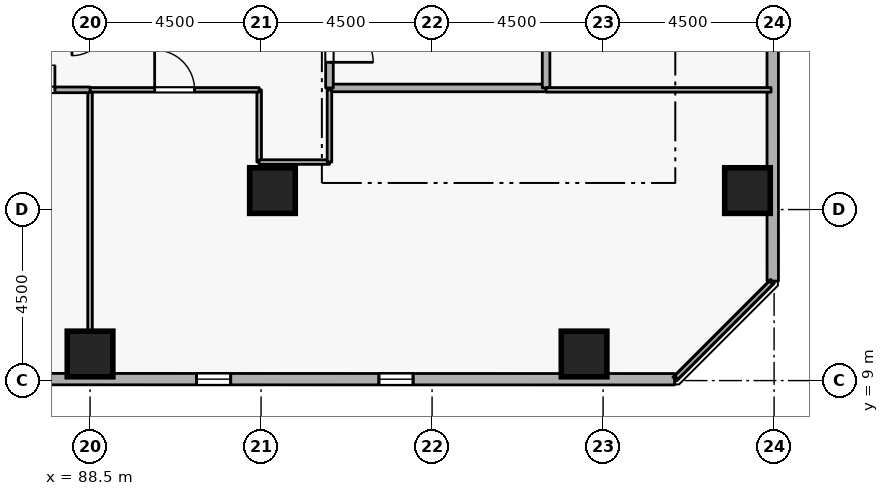
"""IFC4 building model, lengths in metres.
Left out: names, types, materials, properties, quantities, classifications, styles, units other than length and angle.
Written with IfcOpenShell. Run it as: python <this file> out.ifc"""

import sys

from ifc_helpers import new_model, si_unit, direction, frame, frame_2d, origin, origin_2d, place, context, subcontext, project, spatial, rectangle, extrude, element, fill, save


model = new_model("IFC4")
c1 = context("Model", 3, precision=1e-05, world=origin(), true_north=direction((0.0, 1.0)))
c2 = subcontext(c1, "Body", "Model", "MODEL_VIEW")
j1 = project(units=[si_unit("LENGTHUNIT", "METRE"), si_unit("PLANEANGLEUNIT", "RADIAN")], contexts=[c1])
p1 = place(None, origin())
s1 = spatial("IfcSite", under=j1, at=p1, CompositionType="ELEMENT")
p2 = place(p1, origin())
s2 = spatial("IfcBuilding", under=s1, at=p2, CompositionType="ELEMENT")
p3 = place(p2, frame((0.0, 0.0, 90.9)))
s3 = spatial("IfcBuildingStorey", under=s2, at=p3, CompositionType="ELEMENT", Elevation=90.9)
for number, where, z_axis, x_axis in (
    (1, (105.8, 14.0, 0.0), (0.0, 0.0, 1.0), (1.0, 0.0, 0.0)),
    (2, (101.5, 9.7, 0.0), (0.0, 0.0, 1.0), (1.0, 0.0, 0.0)),
    (3, (88.5, 9.7, 0.0), (0.0, 0.0, 1.0), (1.0, 0.0, 0.0)),
    (4, (93.3, 14.0, 0.0), (0.0, 0.0, 1.0), (1.0, 0.0, 0.0)),
):
    element("IfcColumn", number, at=place(p3, frame(where, z_axis=z_axis, x_axis=x_axis)), inside=s3, PredefinedType="COLUMN", context=c2, shape_type="SweptSolid", body=[
        extrude(rectangle(XDim=1.2, YDim=1.2, at=origin_2d()), origin(), (0.0, 0.0, 1.0), 3.6),
    ])
p4 = place(p3, frame((69.401, 9.043, 0.0), z_axis=(0.0, 0.0, 1.0), x_axis=(0.99999997744, -0.000212414941, 0.0)))
e5 = element("IfcWall", 5, at=p4, inside=s3, PredefinedType="STANDARD", context=c2, shape_type="SweptSolid", body=[
    extrude(rectangle(XDim=34.481, YDim=0.3, at=frame_2d((17.24, 0.0))), origin(), (0.0, 0.0, 1.0), 2.7),
])
p5 = place(p4, frame((7.5, 0.0, 0.72)))
e6 = element("IfcOpeningElement", 6, at=p5, cuts=e5, PredefinedType="OPENING", context=c2, shape_type="SweptSolid", body=[
    extrude(rectangle(XDim=0.9, YDim=1.75, at=frame_2d((0.45, 0.875))), frame((0.0, 0.16, 0.0), z_axis=(0.0, -1.0, 0.0), x_axis=(1.0, 0.0, 0.0)), (0.0, 0.0, 1.0), 0.32),
])
p6 = place(p4, frame((12.3, 0.0, 0.72)))
e7 = element("IfcOpeningElement", 7, at=p6, cuts=e5, PredefinedType="OPENING", context=c2, shape_type="SweptSolid", body=[
    extrude(rectangle(XDim=0.9, YDim=1.75, at=frame_2d((0.45, 0.875))), frame((0.0, 0.16, 0.0), z_axis=(0.0, -1.0, 0.0), x_axis=(1.0, 0.0, 0.0)), (0.0, 0.0, 1.0), 0.32),
])
p7 = place(p4, frame((17.1, 0.0, 0.72)))
e8 = element("IfcOpeningElement", 8, at=p7, cuts=e5, PredefinedType="OPENING", context=c2, shape_type="SweptSolid", body=[
    extrude(rectangle(XDim=0.9, YDim=1.75, at=frame_2d((0.45, 0.875))), frame((0.0, 0.16, 0.0), z_axis=(0.0, -1.0, 0.0), x_axis=(1.0, 0.0, 0.0)), (0.0, 0.0, 1.0), 0.32),
])
p8 = place(p4, frame((21.9, 0.0, 0.72)))
e9 = element("IfcOpeningElement", 9, at=p8, cuts=e5, PredefinedType="OPENING", context=c2, shape_type="SweptSolid", body=[
    extrude(rectangle(XDim=0.9, YDim=1.75, at=frame_2d((0.45, 0.875))), frame((0.0, 0.16, 0.0), z_axis=(0.0, -1.0, 0.0), x_axis=(1.0, 0.0, 0.0)), (0.0, 0.0, 1.0), 0.32),
])
p9 = place(p4, frame((26.7, 0.0, 0.72)))
e10 = element("IfcOpeningElement", 10, at=p9, cuts=e5, PredefinedType="OPENING", context=c2, shape_type="SweptSolid", body=[
    extrude(rectangle(XDim=0.9, YDim=1.75, at=frame_2d((0.45, 0.875))), frame((0.0, 0.16, 0.0), z_axis=(0.0, -1.0, 0.0), x_axis=(1.0, 0.0, 0.0)), (0.0, 0.0, 1.0), 0.32),
])
p10 = place(p3, frame((106.465, 11.619, 0.0), z_axis=(0.0, 0.0, 1.0), x_axis=(-0.000212414941, 0.99999997744, 0.0)))
e11 = element("IfcWall", 11, at=p10, inside=s3, PredefinedType="STANDARD", context=c2, shape_type="SweptSolid", body=[
    extrude(rectangle(XDim=34.481, YDim=0.3, at=frame_2d((17.24, 0.0))), origin(), (0.0, 0.0, 1.0), 2.7),
])
p11 = place(p10, frame((7.5, 0.0, 0.72)))
e12 = element("IfcOpeningElement", 12, at=p11, cuts=e11, PredefinedType="OPENING", context=c2, shape_type="SweptSolid", body=[
    extrude(rectangle(XDim=0.9, YDim=1.75, at=frame_2d((0.45, 0.875))), frame((0.0, 0.16, 0.0), z_axis=(0.0, -1.0, 0.0), x_axis=(1.0, 0.0, 0.0)), (0.0, 0.0, 1.0), 0.32),
])
p12 = place(p10, frame((12.3, 0.0, 0.72)))
e13 = element("IfcOpeningElement", 13, at=p12, cuts=e11, PredefinedType="OPENING", context=c2, shape_type="SweptSolid", body=[
    extrude(rectangle(XDim=0.9, YDim=1.75, at=frame_2d((0.45, 0.875))), frame((0.0, 0.16, 0.0), z_axis=(0.0, -1.0, 0.0), x_axis=(1.0, 0.0, 0.0)), (0.0, 0.0, 1.0), 0.32),
])
p13 = place(p10, frame((17.1, 0.0, 0.72)))
e14 = element("IfcOpeningElement", 14, at=p13, cuts=e11, PredefinedType="OPENING", context=c2, shape_type="SweptSolid", body=[
    extrude(rectangle(XDim=0.9, YDim=1.75, at=frame_2d((0.45, 0.875))), frame((0.0, 0.16, 0.0), z_axis=(0.0, -1.0, 0.0), x_axis=(1.0, 0.0, 0.0)), (0.0, 0.0, 1.0), 0.32),
])
p14 = place(p10, frame((21.9, 0.0, 0.72)))
e15 = element("IfcOpeningElement", 15, at=p14, cuts=e11, PredefinedType="OPENING", context=c2, shape_type="SweptSolid", body=[
    extrude(rectangle(XDim=0.9, YDim=1.75, at=frame_2d((0.45, 0.875))), frame((0.0, 0.16, 0.0), z_axis=(0.0, -1.0, 0.0), x_axis=(1.0, 0.0, 0.0)), (0.0, 0.0, 1.0), 0.32),
])
p15 = place(p10, frame((31.5, 0.0, 0.72)))
e16 = element("IfcOpeningElement", 16, at=p15, cuts=e11, PredefinedType="OPENING", context=c2, shape_type="SweptSolid", body=[
    extrude(rectangle(XDim=0.9, YDim=1.75, at=frame_2d((0.45, 0.875))), frame((0.0, 0.16, 0.0), z_axis=(0.0, -1.0, 0.0), x_axis=(1.0, 0.0, 0.0)), (0.0, 0.0, 1.0), 0.32),
])
p16 = place(p3, frame((94.8, 16.7, 0.0), z_axis=(0.0, 0.0, 1.0), x_axis=(1.0, 0.0, 0.0)))
e17 = element("IfcWall", 17, at=p16, inside=s3, PredefinedType="STANDARD", context=c2, shape_type="SweptSolid", body=[
    extrude(rectangle(XDim=5.7, YDim=0.2, at=frame_2d((2.85, 0.0))), origin(), (0.0, 0.0, 1.0), 3.34),
])
p17 = place(p3, frame((100.5, 16.7, 0.0), z_axis=(0.0, 0.0, 1.0), x_axis=(0.0, 1.0, 0.0)))
e18 = element("IfcWall", 18, at=p17, inside=s3, PredefinedType="STANDARD", context=c2, shape_type="SweptSolid", body=[
    extrude(rectangle(XDim=2.5, YDim=0.2, at=frame_2d((1.25, 0.0))), origin(), (0.0, 0.0, 1.0), 3.34),
])
p18 = place(p3, frame((94.8, 19.2, 0.0), z_axis=(0.0, 0.0, 1.0), x_axis=(0.0, -1.0, 0.0)))
e19 = element("IfcWall", 19, at=p18, inside=s3, PredefinedType="STANDARD", context=c2, shape_type="SweptSolid", body=[
    extrude(rectangle(XDim=2.5, YDim=0.2, at=frame_2d((1.25, 0.0))), origin(), (0.0, 0.0, 1.0), 3.34),
])
p19 = place(p18, frame((0.675, 0.0, 0.0)))
e20 = element("IfcOpeningElement", 20, at=p19, cuts=e19, PredefinedType="OPENING", context=c2, shape_type="SweptSolid", body=[
    extrude(rectangle(XDim=1.15, YDim=2.1, at=frame_2d((0.575, 1.05))), frame((0.0, 0.11, 0.0), z_axis=(0.0, -1.0, 0.0), x_axis=(1.0, 0.0, 0.0)), (0.0, 0.0, 1.0), 0.22),
])
p20 = place(p3, frame((92.95, 16.65, 0.0), z_axis=(0.0, 0.0, 1.0), x_axis=(0.0, -1.0, 0.0)))
e21 = element("IfcWall", 21, at=p20, inside=s3, PredefinedType="PARTITIONING", context=c2, shape_type="SweptSolid", body=[
    extrude(rectangle(XDim=1.9, YDim=0.12, at=frame_2d((0.95, 0.0))), origin(), (0.0, 0.0, 1.0), 3.34),
])
p21 = place(p3, frame((92.95, 14.75, 0.0), z_axis=(0.0, 0.0, 1.0), x_axis=(1.0, 0.0, 0.0)))
e22 = element("IfcWall", 22, at=p21, inside=s3, PredefinedType="PARTITIONING", context=c2, shape_type="SweptSolid", body=[
    extrude(rectangle(XDim=1.85, YDim=0.12, at=frame_2d((0.925, 0.0))), origin(), (0.0, 0.0, 1.0), 3.34),
])
p22 = place(p3, frame((94.8, 14.75, 0.0), z_axis=(0.0, 0.0, 1.0), x_axis=(0.0, 1.0, 0.0)))
e23 = element("IfcWall", 23, at=p22, inside=s3, PredefinedType="PARTITIONING", context=c2, shape_type="SweptSolid", body=[
    extrude(rectangle(XDim=1.9, YDim=0.12, at=frame_2d((0.95, 0.0))), origin(), (0.0, 0.0, 1.0), 3.34),
])
p23 = place(p3, frame((100.5, 16.65, 0.0), z_axis=(0.0, 0.0, 1.0), x_axis=(1.0, 0.0, 0.0)))
e24 = element("IfcWall", 24, at=p23, inside=s3, PredefinedType="PARTITIONING", context=c2, shape_type="SweptSolid", body=[
    extrude(rectangle(XDim=5.92, YDim=0.12, at=frame_2d((2.96, 0.0))), origin(), (0.0, 0.0, 1.0), 3.34),
])
p24 = place(p3, frame((106.42, 11.575, 0.0), z_axis=(0.0, 0.0, 1.0), x_axis=(-0.707106781187, -0.707106781187, 0.0)))
e25 = element("IfcWall", 25, at=p24, inside=s3, PredefinedType="PARTITIONING", context=c2, shape_type="SweptSolid", body=[
    extrude(rectangle(XDim=3.528, YDim=0.12, at=frame_2d((1.764, 0.0))), origin(), (0.0, 0.0, 1.0), 3.34),
])
p25 = place(p3, frame((88.5, 9.7, 0.0), z_axis=(0.0, 0.0, 1.0), x_axis=(0.0, 1.0, 0.0)))
e26 = element("IfcWall", 26, at=p25, inside=s3, PredefinedType="PARTITIONING", context=c2, shape_type="SweptSolid", body=[
    extrude(rectangle(XDim=6.95, YDim=0.12, at=frame_2d((3.475, 0.0))), origin(), (0.0, 0.0, 1.0), 2.932),
])
p26 = place(p3, frame((88.5, 16.65, 0.0), z_axis=(0.0, 0.0, 1.0), x_axis=(1.0, 0.0, 0.0)))
e27 = element("IfcWall", 27, at=p26, inside=s3, PredefinedType="PARTITIONING", context=c2, shape_type="SweptSolid", body=[
    extrude(rectangle(XDim=4.45, YDim=0.12, at=frame_2d((2.225, 0.0))), origin(), (0.0, 0.0, 1.0), 3.34),
])
p27 = place(p26, frame((1.7, 0.0, 0.0)))
e28 = element("IfcOpeningElement", 28, at=p27, cuts=e27, PredefinedType="OPENING", context=c2, shape_type="SweptSolid", body=[
    extrude(rectangle(XDim=1.05, YDim=2.1, at=frame_2d((0.525, 1.05))), frame((0.0, 0.07, 0.0), z_axis=(0.0, -1.0, 0.0), x_axis=(1.0, 0.0, 0.0)), (0.0, 0.0, 1.0), 0.14),
])
p28 = place(p3, frame((85.35, 16.65, 0.0), z_axis=(0.0, 0.0, 1.0), x_axis=(1.0, 0.0, 0.0)))
e29 = element("IfcWall", 29, at=p28, inside=s3, PredefinedType="PARTITIONING", context=c2, shape_type="SweptSolid", body=[
    extrude(rectangle(XDim=3.15, YDim=0.15, at=frame_2d((1.575, 0.0))), origin(), (0.0, 0.0, 1.0), 3.34),
])
p29 = place(p28, frame((0.925, 0.0, 0.0)))
e30 = element("IfcOpeningElement", 30, at=p29, cuts=e29, PredefinedType="OPENING", context=c2, shape_type="SweptSolid", body=[
    extrude(rectangle(XDim=1.3, YDim=2.12, at=frame_2d((0.65, 1.06))), frame((0.0, 0.085, 0.0), z_axis=(0.0, -1.0, 0.0), x_axis=(1.0, 0.0, 0.0)), (0.0, 0.0, 1.0), 0.17),
])
p30 = place(p8, origin())
e31 = element("IfcWindow", 31, at=p30, inside=s3, PartitioningType="SINGLE_PANEL", PredefinedType="WINDOW", context=c2, shape_type="SweptSolid", body=[
    extrude(rectangle(XDim=0.9, YDim=1.75, at=frame_2d((0.45, 0.875))), frame((0.0, 0.03, 0.0), z_axis=(0.0, -1.0, 0.0), x_axis=(1.0, 0.0, 0.0)), (0.0, 0.0, 1.0), 0.06),
])
fill(e9, e31)
p31 = place(p9, origin())
e32 = element("IfcWindow", 32, at=p31, inside=s3, PartitioningType="SINGLE_PANEL", PredefinedType="WINDOW", context=c2, shape_type="SweptSolid", body=[
    extrude(rectangle(XDim=0.9, YDim=1.75, at=frame_2d((0.45, 0.875))), frame((0.0, 0.03, 0.0), z_axis=(0.0, -1.0, 0.0), x_axis=(1.0, 0.0, 0.0)), (0.0, 0.0, 1.0), 0.06),
])
fill(e10, e32)
p32 = place(p19, origin())
e33 = element("IfcDoor", 33, at=p32, inside=s3, OperationType="SINGLE_SWING_RIGHT", PredefinedType="DOOR", context=c2, shape_type="SweptSolid", body=[
    extrude(rectangle(XDim=1.15, YDim=2.1, at=frame_2d((0.575, 1.05))), frame((0.0, 0.025, 0.0), z_axis=(0.0, -1.0, 0.0), x_axis=(1.0, 0.0, 0.0)), (0.0, 0.0, 1.0), 0.05),
])
fill(e20, e33)
p33 = place(p27, origin())
e34 = element("IfcDoor", 34, at=p33, inside=s3, OperationType="SINGLE_SWING_LEFT", PredefinedType="DOOR", context=c2, shape_type="SweptSolid", body=[
    extrude(rectangle(XDim=1.05, YDim=2.1, at=frame_2d((0.525, 1.05))), frame((0.0, 0.025, 0.0), z_axis=(0.0, -1.0, 0.0), x_axis=(1.0, 0.0, 0.0)), (0.0, 0.0, 1.0), 0.05),
])
fill(e28, e34)
p34 = place(p29, origin())
e35 = element("IfcDoor", 35, at=p34, inside=s3, OperationType="DOUBLE_DOOR_SINGLE_SWING", PredefinedType="DOOR", context=c2, shape_type="SweptSolid", body=[
    extrude(rectangle(XDim=1.3, YDim=2.12, at=frame_2d((0.65, 1.06))), frame((0.0, 0.025, 0.0), z_axis=(0.0, -1.0, 0.0), x_axis=(1.0, 0.0, 0.0)), (0.0, 0.0, 1.0), 0.05),
])
fill(e30, e35)
save(model, sys.argv[1])
